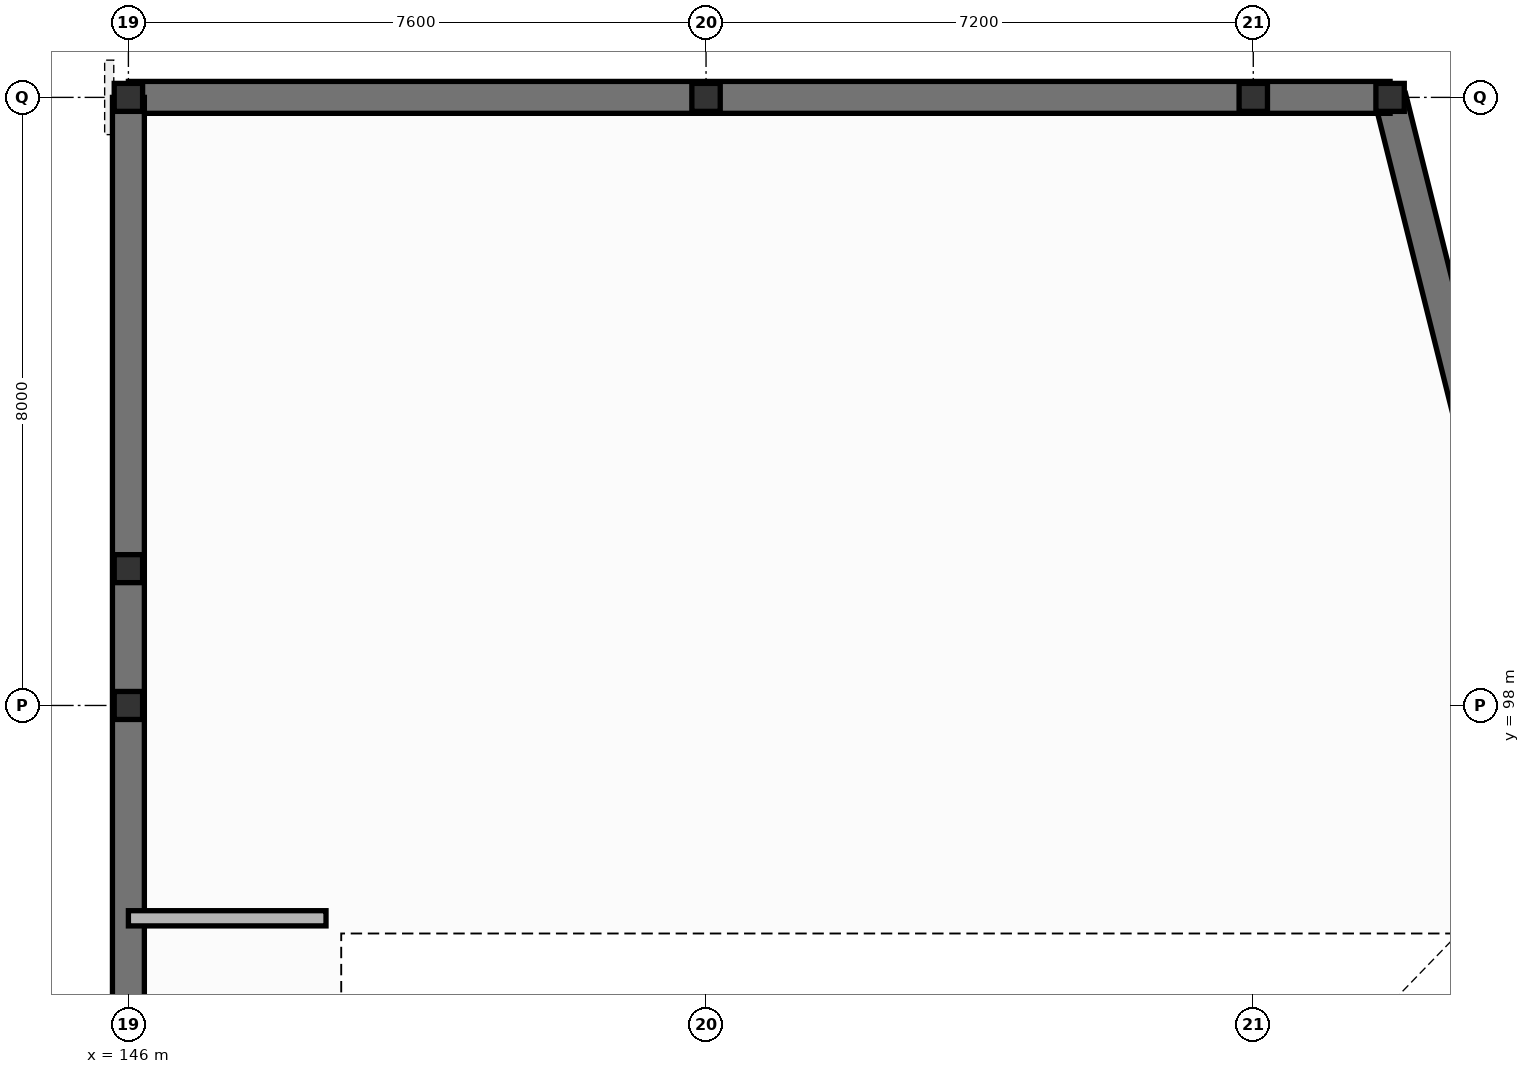
"""IFC4 building model, lengths in metres.
Left out: names, types, materials, properties, quantities, classifications, styles, units other than length and angle.
Written with IfcOpenShell. Run it as: python <this file> out.ifc"""

import sys

from ifc_helpers import new_model, si_unit, direction, frame, frame_2d, origin, origin_2d, place, context, subcontext, project, spatial, polyline, rectangle, i_section, outline, extrude, element, fill, save


model = new_model("IFC4")
c1 = context("Model", 3, precision=1e-05, world=origin(), true_north=direction((0.0, 1.0)))
c2 = subcontext(c1, "Body", "Model", "MODEL_VIEW")
j1 = project(units=[si_unit("LENGTHUNIT", "METRE"), si_unit("PLANEANGLEUNIT", "RADIAN")], contexts=[c1])
p1 = place(None, origin())
s1 = spatial("IfcSite", under=j1, at=p1, CompositionType="ELEMENT")
p2 = place(p1, origin())
s2 = spatial("IfcBuilding", under=s1, at=p2, CompositionType="ELEMENT")
p3 = place(p2, frame((0.0, 0.0, 8.94)))
s3 = spatial("IfcBuildingStorey", under=s2, at=p3, CompositionType="ELEMENT", Elevation=8.94)
for number, where, z_axis, x_axis in (
    (1, (146.0, 98.0, 0.0), (0.0, 0.0, 1.0), (1.0, 0.0, 0.0)),
    (2, (146.0, 106.0, 0.0), (0.0, 0.0, 1.0), (1.0, 0.0, 0.0)),
    (3, (153.6, 106.0, 0.0), (0.0, 0.0, 1.0), (1.0, 0.0, 0.0)),
    (4, (160.8, 106.0, 0.0), (0.0, 0.0, 1.0), (1.0, 0.0, 0.0)),
    (5, (162.6, 106.0, 0.0), (0.0, 0.0, 1.0), (1.0, 0.0, 0.0)),
    (6, (146.0, 99.8, 0.0), (0.0, 0.0, 1.0), (1.0, 0.0, 0.0)),
):
    element("IfcColumn", number, at=place(p3, frame(where, z_axis=z_axis, x_axis=x_axis)), inside=s3, PredefinedType="COLUMN", context=c2, shape_type="SweptSolid", body=[
        extrude(i_section(OverallWidth=0.373, OverallDepth=0.368, WebThickness=0.015, FlangeThickness=0.024, at=origin_2d()), origin(), (0.0, 0.0, 1.0), 3.84),
    ])
p4 = place(p3, frame((168.0, 84.4, 0.0), z_axis=(0.0, 0.0, 1.0), x_axis=(-0.242530464893, 0.970143790167, 0.0)))
e7 = element("IfcWall", 7, at=p4, inside=s3, PredefinedType="SOLIDWALL", context=c2, shape_type="SweptSolid", body=[
    extrude(outline(polyline([(0.0, 0.0), (22.265, 0.0), (22.265, 5.241), (0.0, 3.94), (0.0, 0.0)])), frame((0.0, 0.21, 0.0), z_axis=(0.0, -1.0, 0.0), x_axis=(1.0, 0.0, 0.0)), (0.0, 0.0, 1.0), 0.42),
])
p5 = place(p4, frame((4.5, 0.0, 0.95)))
e8 = element("IfcOpeningElement", 8, at=p5, cuts=e7, PredefinedType="OPENING", context=c2, shape_type="SweptSolid", body=[
    extrude(rectangle(XDim=1.15, YDim=2.3, at=frame_2d((0.575, 1.15))), frame((0.0, 0.22, 0.0), z_axis=(0.0, -1.0, 0.0), x_axis=(1.0, 0.0, 0.0)), (0.0, 0.0, 1.0), 0.44),
])
p6 = place(p4, frame((12.5, 0.0, 0.95)))
e9 = element("IfcOpeningElement", 9, at=p6, cuts=e7, PredefinedType="OPENING", context=c2, shape_type="SweptSolid", body=[
    extrude(rectangle(XDim=1.15, YDim=2.3, at=frame_2d((0.575, 1.15))), frame((0.0, 0.22, 0.0), z_axis=(0.0, -1.0, 0.0), x_axis=(1.0, 0.0, 0.0)), (0.0, 0.0, 1.0), 0.44),
])
p7 = place(p3, frame((146.0, 106.0, 0.0), z_axis=(0.0, 0.0, 1.0), x_axis=(1.0, 0.0, 0.0)))
e10 = element("IfcWall", 10, at=p7, inside=s3, PredefinedType="SOLIDWALL", context=c2, shape_type="SweptSolid", body=[
    extrude(outline(polyline([(0.0, 0.0), (16.6, 0.0), (16.6, 5.241), (0.0, 9.24), (0.0, 0.0)])), frame((0.0, 0.21, 0.0), z_axis=(0.0, -1.0, 0.0), x_axis=(1.0, 0.0, 0.0)), (0.0, 0.0, 1.0), 0.42),
])
p8 = place(p7, frame((3.5, 0.0, 1.0)))
e11 = element("IfcOpeningElement", 11, at=p8, cuts=e10, PredefinedType="OPENING", context=c2, shape_type="SweptSolid", body=[
    extrude(rectangle(XDim=2.05, YDim=1.85, at=frame_2d((1.025, 0.925))), frame((0.0, 0.22, 0.0), z_axis=(0.0, -1.0, 0.0), x_axis=(1.0, 0.0, 0.0)), (0.0, 0.0, 1.0), 0.44),
])
p9 = place(p7, frame((10.2, 0.0, 1.0)))
e12 = element("IfcOpeningElement", 12, at=p9, cuts=e10, PredefinedType="OPENING", context=c2, shape_type="SweptSolid", body=[
    extrude(rectangle(XDim=1.5, YDim=2.1, at=frame_2d((0.75, 1.05))), frame((0.0, 0.22, 0.0), z_axis=(0.0, -1.0, 0.0), x_axis=(1.0, 0.0, 0.0)), (0.0, 0.0, 1.0), 0.44),
])
p10 = place(p3, frame((146.0, 82.2, 0.0), z_axis=(0.0, 0.0, 1.0), x_axis=(0.0, 1.0, 0.0)))
e13 = element("IfcWall", 13, at=p10, inside=s3, PredefinedType="SOLIDWALL", context=c2, shape_type="SweptSolid", body=[
    extrude(rectangle(XDim=23.8, YDim=0.42, at=frame_2d((11.9, 0.0))), origin(), (0.0, 0.0, 1.0), 9.24),
])
p11 = place(p3, frame((146.0, 95.2, 0.0), z_axis=(0.0, 0.0, 1.0), x_axis=(1.0, 0.0, 0.0)))
e14 = element("IfcWall", 14, at=p11, inside=s3, PredefinedType="PARTITIONING", context=c2, shape_type="SweptSolid", body=[
    extrude(rectangle(XDim=2.6, YDim=0.2, at=frame_2d((1.3, 0.0))), origin(), (0.0, 0.0, 1.0), 3.53),
])
p12 = place(p11, frame((0.8, 0.0, 0.0)))
e15 = element("IfcOpeningElement", 15, at=p12, cuts=e14, PredefinedType="OPENING", context=c2, shape_type="SweptSolid", body=[
    extrude(rectangle(XDim=1.0, YDim=2.15, at=frame_2d((0.5, 1.075))), frame((0.0, 0.11, 0.0), z_axis=(0.0, -1.0, 0.0), x_axis=(1.0, 0.0, 0.0)), (0.0, 0.0, 1.0), 0.22),
])
p13 = place(p8, origin())
e16 = element("IfcWindow", 16, at=p13, inside=s3, PartitioningType="SINGLE_PANEL", PredefinedType="WINDOW", context=c2, shape_type="SweptSolid", body=[
    extrude(rectangle(XDim=2.05, YDim=1.85, at=frame_2d((1.025, 0.925))), frame((0.0, 0.03, 0.0), z_axis=(0.0, -1.0, 0.0), x_axis=(1.0, 0.0, 0.0)), (0.0, 0.0, 1.0), 0.06),
])
fill(e11, e16)
p14 = place(p9, origin())
e17 = element("IfcWindow", 17, at=p14, inside=s3, PartitioningType="SINGLE_PANEL", PredefinedType="WINDOW", context=c2, shape_type="SweptSolid", body=[
    extrude(rectangle(XDim=1.5, YDim=2.1, at=frame_2d((0.75, 1.05))), frame((0.0, 0.03, 0.0), z_axis=(0.0, -1.0, 0.0), x_axis=(1.0, 0.0, 0.0)), (0.0, 0.0, 1.0), 0.06),
])
fill(e12, e17)
p15 = place(p12, origin())
e18 = element("IfcDoor", 18, at=p15, inside=s3, OperationType="SINGLE_SWING_LEFT", PredefinedType="DOOR", context=c2, shape_type="SweptSolid", body=[
    extrude(rectangle(XDim=1.0, YDim=2.15, at=frame_2d((0.5, 1.075))), frame((0.0, 0.025, 0.0), z_axis=(0.0, -1.0, 0.0), x_axis=(1.0, 0.0, 0.0)), (0.0, 0.0, 1.0), 0.05),
])
fill(e15, e18)
save(model, sys.argv[1])
